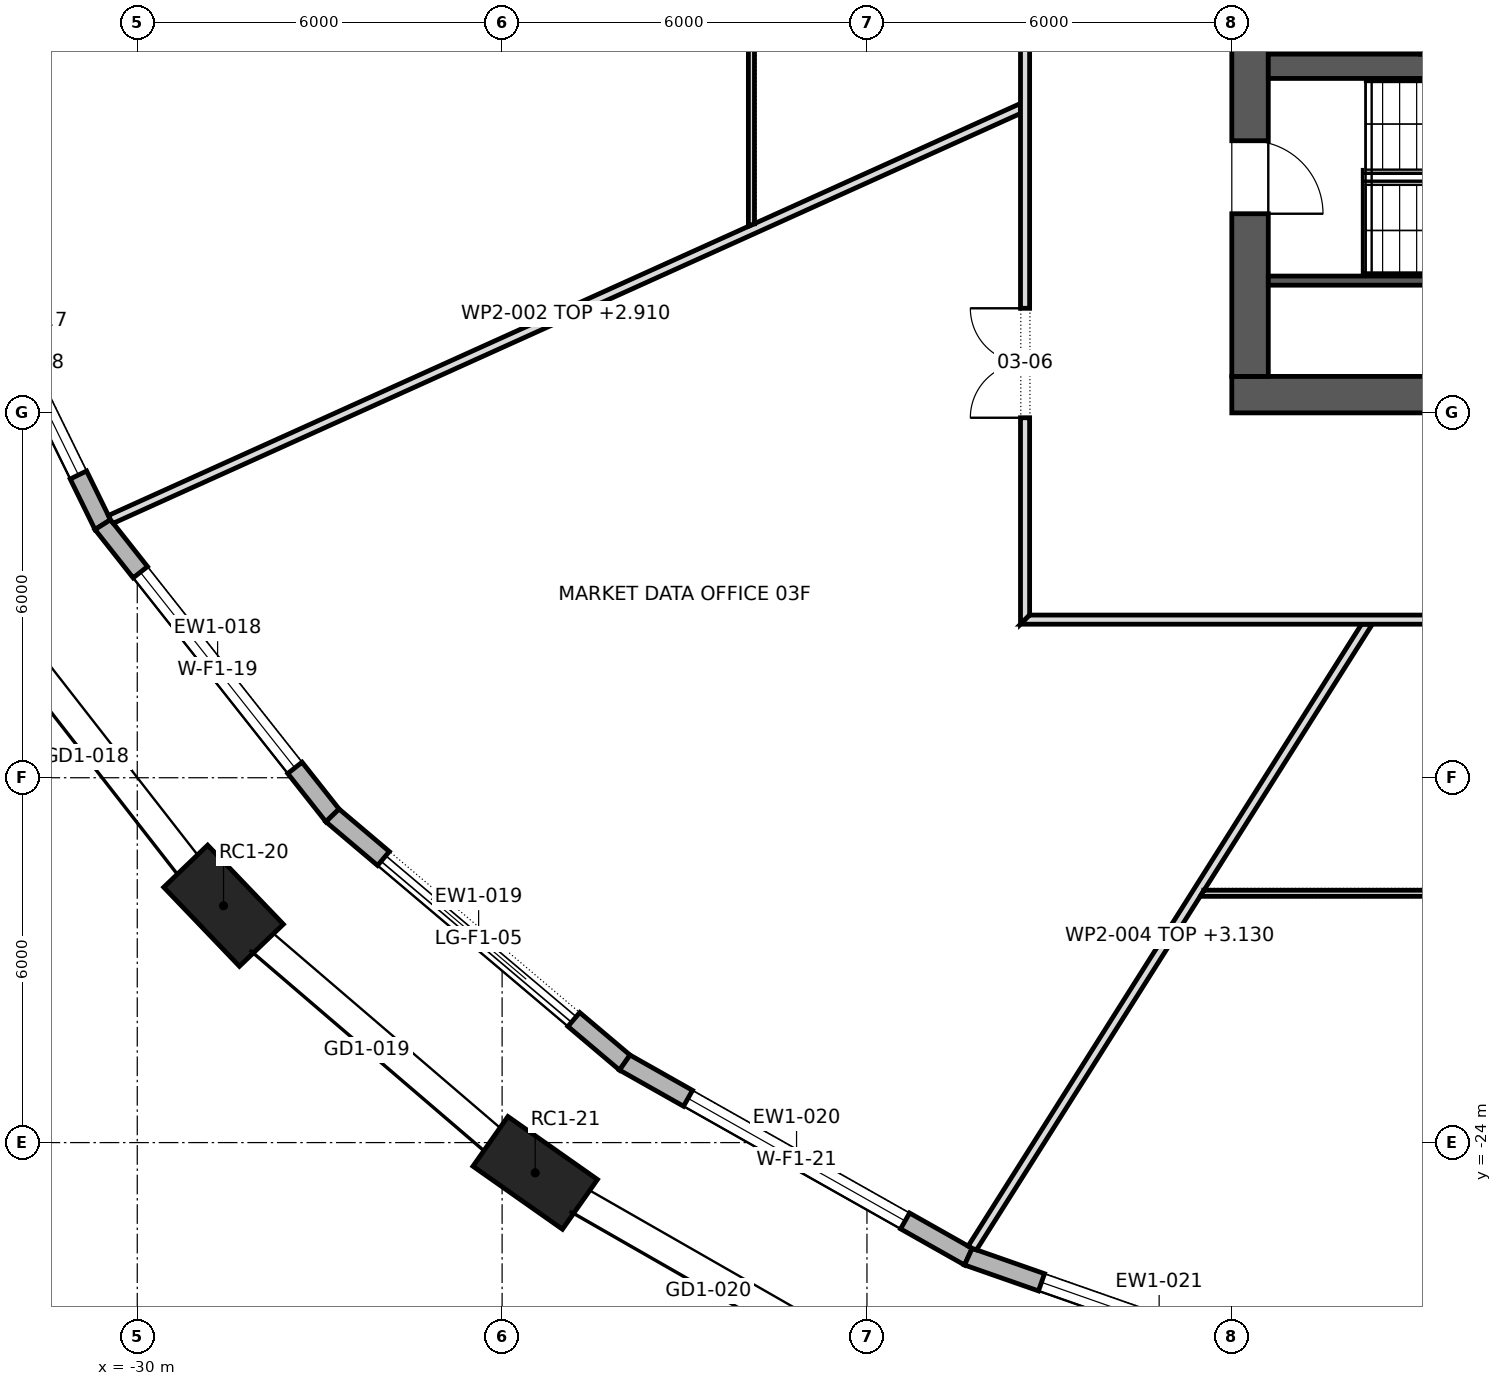
"""IFC4 building model, lengths in metres.
Left out: names, types, materials, properties, quantities, classifications, styles, units other than length and angle.
Written with IfcOpenShell. Run it as: python <this file> out.ifc"""

import sys

from ifc_helpers import new_model, si_unit, direction, frame, frame_2d, origin, origin_2d, place, context, subcontext, project, spatial, polyline, rectangle, outline, extrude, element, fill, save


model = new_model("IFC4")
c1 = context("Model", 3, precision=1e-05, world=origin(), true_north=direction((0.0, 1.0)))
c2 = subcontext(c1, "Body", "Model", "MODEL_VIEW")
j1 = project(units=[si_unit("LENGTHUNIT", "METRE"), si_unit("PLANEANGLEUNIT", "RADIAN")], contexts=[c1])
p1 = place(None, origin())
s1 = spatial("IfcSite", under=j1, at=p1, CompositionType="ELEMENT")
p2 = place(p1, origin())
s2 = spatial("IfcBuilding", under=s1, at=p2, CompositionType="ELEMENT")
p3 = place(p2, frame((0.0, 0.0, 57.1)))
s3 = spatial("IfcBuildingStorey", under=s2, at=p3, CompositionType="ELEMENT", Elevation=57.1)
for number, where, z_axis, x_axis in (
    (1, (-28.581, -20.105, 0.0), (0.0, 0.0, 1.0), (0.692, -0.722, 0.0)),
    (2, (-23.456, -24.498, 0.0), (0.0, 0.0, 1.0), (0.818, -0.575, 0.0)),
):
    element("IfcColumn", number, at=place(p3, frame(where, z_axis=z_axis, x_axis=x_axis)), inside=s3, PredefinedType="COLUMN", context=c2, shape_type="SweptSolid", body=[
        extrude(rectangle(XDim=1.8, YDim=1.0, at=origin_2d()), origin(), (0.0, 0.0, 1.0), 4.2),
    ])
p4 = place(p3, frame((-12.0, -11.7, 0.0), z_axis=(0.0, 0.0, 1.0), x_axis=(1.0, 0.0, 0.0)))
e3 = element("IfcWall", 3, at=p4, inside=s3, PredefinedType="SHEAR", context=c2, shape_type="SweptSolid", body=[
    extrude(rectangle(XDim=24.0, YDim=0.6, at=frame_2d((12.0, 0.0))), origin(), (0.0, 0.0, 1.0), 4.2),
])
p5 = place(p4, frame((9.975, 0.0, 0.0)))
e4 = element("IfcOpeningElement", 4, at=p5, cuts=e3, PredefinedType="OPENING", context=c2, shape_type="SweptSolid", body=[
    extrude(rectangle(XDim=0.9, YDim=2.1, at=frame_2d((0.45, 1.05))), frame((0.0, 0.312, 0.0), z_axis=(0.0, -1.0, 0.0), x_axis=(1.0, 0.0, 0.0)), (0.0, 0.0, 1.0), 0.624),
])
p6 = place(p4, frame((4.6, 0.0, 0.0)))
e5 = element("IfcOpeningElement", 5, at=p6, cuts=e3, PredefinedType="OPENING", context=c2, shape_type="SweptSolid", body=[
    extrude(rectangle(XDim=0.8, YDim=2.1, at=frame_2d((0.4, 1.05))), frame((0.0, 0.312, 0.0), z_axis=(0.0, -1.0, 0.0), x_axis=(1.0, 0.0, 0.0)), (0.0, 0.0, 1.0), 0.624),
])
p7 = place(p4, frame((7.0, 0.0, 0.0)))
e6 = element("IfcOpeningElement", 6, at=p7, cuts=e3, PredefinedType="OPENING", context=c2, shape_type="SweptSolid", body=[
    extrude(rectangle(XDim=0.8, YDim=2.1, at=frame_2d((0.4, 1.05))), frame((0.0, 0.312, 0.0), z_axis=(0.0, -1.0, 0.0), x_axis=(1.0, 0.0, 0.0)), (0.0, 0.0, 1.0), 0.624),
])
p8 = place(p4, frame((15.85, 0.0, 0.0)))
e7 = element("IfcOpeningElement", 7, at=p8, cuts=e3, PredefinedType="OPENING", context=c2, shape_type="SweptSolid", body=[
    extrude(rectangle(XDim=0.8, YDim=2.1, at=frame_2d((0.4, 1.05))), frame((0.0, 0.312, 0.0), z_axis=(0.0, -1.0, 0.0), x_axis=(1.0, 0.0, 0.0)), (0.0, 0.0, 1.0), 0.624),
])
p9 = place(p3, frame((-11.7, -11.4, 0.0), z_axis=(0.0, 0.0, 1.0), x_axis=(0.0, 1.0, 0.0)))
e8 = element("IfcWall", 8, at=p9, inside=s3, PredefinedType="SHEAR", context=c2, shape_type="SweptSolid", body=[
    extrude(rectangle(XDim=22.8, YDim=0.6, at=frame_2d((11.4, 0.0))), origin(), (0.0, 0.0, 1.0), 4.2),
])
p10 = place(p9, frame((10.2, 0.0, 0.0)))
e9 = element("IfcOpeningElement", 9, at=p10, cuts=e8, PredefinedType="OPENING", context=c2, shape_type="SweptSolid", body=[
    extrude(rectangle(XDim=2.4, YDim=2.1, at=frame_2d((1.2, 1.05))), frame((0.0, 0.312, 0.0), z_axis=(0.0, -1.0, 0.0), x_axis=(1.0, 0.0, 0.0)), (0.0, 0.0, 1.0), 0.624),
])
p11 = place(p9, frame((18.925, 0.0, 0.0)))
e10 = element("IfcOpeningElement", 10, at=p11, cuts=e8, PredefinedType="OPENING", context=c2, shape_type="SweptSolid", body=[
    extrude(rectangle(XDim=1.2, YDim=2.1, at=frame_2d((0.6, 1.05))), frame((0.0, 0.312, 0.0), z_axis=(0.0, -1.0, 0.0), x_axis=(1.0, 0.0, 0.0)), (0.0, 0.0, 1.0), 0.624),
])
p12 = place(p9, frame((2.675, 0.0, 0.0)))
e11 = element("IfcOpeningElement", 11, at=p12, cuts=e8, PredefinedType="OPENING", context=c2, shape_type="SweptSolid", body=[
    extrude(rectangle(XDim=1.2, YDim=2.1, at=frame_2d((0.6, 1.05))), frame((0.0, 0.312, 0.0), z_axis=(0.0, -1.0, 0.0), x_axis=(1.0, 0.0, 0.0)), (0.0, 0.0, 1.0), 0.624),
])
p13 = place(p3, frame((-11.4, -6.3, 0.0), z_axis=(0.0, 0.0, 1.0), x_axis=(1.0, 0.0, 0.0)))
e12 = element("IfcWall", 12, at=p13, inside=s3, PredefinedType="SHEAR", context=c2, shape_type="SweptSolid", body=[
    extrude(rectangle(XDim=22.8, YDim=0.4, at=frame_2d((11.4, 0.0))), origin(), (0.0, 0.0, 1.0), 4.2),
])
p14 = place(p13, frame((20.85, 0.0, 0.0)))
e13 = element("IfcOpeningElement", 13, at=p14, cuts=e12, PredefinedType="OPENING", context=c2, shape_type="SweptSolid", body=[
    extrude(rectangle(XDim=1.1, YDim=2.1, at=frame_2d((0.55, 1.05))), frame((0.0, 0.212, 0.0), z_axis=(0.0, -1.0, 0.0), x_axis=(1.0, 0.0, 0.0)), (0.0, 0.0, 1.0), 0.424),
])
p15 = place(p3, frame((-8.75, -6.1, 0.0), z_axis=(0.0, 0.0, 1.0), x_axis=(0.0, 1.0, 0.0)))
e14 = element("IfcWall", 14, at=p15, inside=s3, PredefinedType="SHEAR", context=c2, shape_type="SweptSolid", body=[
    extrude(rectangle(XDim=2.9, YDim=0.3, at=frame_2d((1.45, 0.0))), origin(), (0.0, 0.0, 1.0), 4.2),
])
p16 = place(p3, frame((-33.172, -8.523, 0.0), z_axis=(0.0, 0.0, 1.0), x_axis=(0.439906146647, -0.898043752911, 0.0)))
e15 = element("IfcWall", 15, at=p16, inside=s3, PredefinedType="STANDARD", context=c2, shape_type="SweptSolid", body=[
    extrude(outline(polyline([(-0.017, -0.15), (5.935, -0.15), (5.903, 0.15), (0.017, 0.15), (-0.017, -0.15)])), origin(), (0.0, 0.0, 1.0), 3.9),
])
p17 = place(p16, frame((0.909, 0.0, 0.6)))
e16 = element("IfcOpeningElement", 16, at=p17, cuts=e15, PredefinedType="OPENING", context=c2, shape_type="SweptSolid", body=[
    extrude(rectangle(XDim=4.1, YDim=2.85, at=frame_2d((2.05, 1.425))), frame((0.0, 0.162, 0.0), z_axis=(0.0, -1.0, 0.0), x_axis=(1.0, 0.0, 0.0)), (0.0, 0.0, 1.0), 0.324),
])
p18 = place(p3, frame((-30.568, -13.838, 0.0), z_axis=(0.0, 0.0, 1.0), x_axis=(0.619993638342, -0.78460683684, 0.0)))
e17 = element("IfcWall", 17, at=p18, inside=s3, PredefinedType="STANDARD", context=c2, shape_type="SweptSolid", body=[
    extrude(outline(polyline([(-0.016, -0.15), (6.109, -0.15), (6.079, 0.15), (0.016, 0.15), (-0.016, -0.15)])), origin(), (0.0, 0.0, 1.0), 3.9),
])
p19 = place(p18, frame((0.997, 0.0, 0.6)))
e18 = element("IfcOpeningElement", 18, at=p19, cuts=e17, PredefinedType="OPENING", context=c2, shape_type="SweptSolid", body=[
    extrude(rectangle(XDim=4.1, YDim=2.85, at=frame_2d((2.05, 1.425))), frame((0.0, 0.162, 0.0), z_axis=(0.0, -1.0, 0.0), x_axis=(1.0, 0.0, 0.0)), (0.0, 0.0, 1.0), 0.324),
])
p20 = place(p3, frame((-26.79, -18.62, 0.0), z_axis=(0.0, 0.0, 1.0), x_axis=(0.763614259808, -0.645672720671, 0.0)))
e19 = element("IfcWall", 19, at=p20, inside=s3, PredefinedType="STANDARD", context=c2, shape_type="SweptSolid", body=[
    extrude(outline(polyline([(-0.015, -0.15), (6.309, -0.15), (6.281, 0.15), (0.015, 0.15), (-0.015, -0.15)])), origin(), (0.0, 0.0, 1.0), 3.9),
])
p21 = place(p20, frame((1.097, 0.0, 0.0)))
e20 = element("IfcOpeningElement", 20, at=p21, cuts=e19, PredefinedType="OPENING", context=c2, shape_type="SweptSolid", body=[
    extrude(rectangle(XDim=4.1, YDim=3.45, at=frame_2d((2.05, 1.725))), frame((0.0, 0.162, 0.0), z_axis=(0.0, -1.0, 0.0), x_axis=(1.0, 0.0, 0.0)), (0.0, 0.0, 1.0), 0.324),
])
p22 = place(p3, frame((-21.983, -22.684, 0.0), z_axis=(0.0, 0.0, 1.0), x_axis=(0.870647609977, -0.491907246584, 0.0)))
e21 = element("IfcWall", 21, at=p22, inside=s3, PredefinedType="STANDARD", context=c2, shape_type="SweptSolid", body=[
    extrude(outline(polyline([(-0.014, -0.15), (6.503, -0.15), (6.476, 0.15), (0.014, 0.15), (-0.014, -0.15)])), origin(), (0.0, 0.0, 1.0), 3.9),
])
p23 = place(p22, frame((1.195, 0.0, 0.6)))
e22 = element("IfcOpeningElement", 22, at=p23, cuts=e21, PredefinedType="OPENING", context=c2, shape_type="SweptSolid", body=[
    extrude(rectangle(XDim=4.1, YDim=2.85, at=frame_2d((2.05, 1.425))), frame((0.0, 0.162, 0.0), z_axis=(0.0, -1.0, 0.0), x_axis=(1.0, 0.0, 0.0)), (0.0, 0.0, 1.0), 0.324),
])
p24 = place(p3, frame((-16.333, -25.876, 0.0), z_axis=(0.0, 0.0, 1.0), x_axis=(0.943790794479, -0.330543395421, 0.0)))
e23 = element("IfcWall", 23, at=p24, inside=s3, PredefinedType="STANDARD", context=c2, shape_type="SweptSolid", body=[
    extrude(outline(polyline([(-0.013, -0.15), (6.662, -0.15), (6.637, 0.15), (0.013, 0.15), (-0.013, -0.15)])), origin(), (0.0, 0.0, 1.0), 3.9),
])
p25 = place(p24, frame((1.275, 0.0, 0.6)))
e24 = element("IfcOpeningElement", 24, at=p25, cuts=e23, PredefinedType="OPENING", context=c2, shape_type="SweptSolid", body=[
    extrude(rectangle(XDim=4.1, YDim=2.85, at=frame_2d((2.05, 1.425))), frame((0.0, 0.162, 0.0), z_axis=(0.0, -1.0, 0.0), x_axis=(1.0, 0.0, 0.0)), (0.0, 0.0, 1.0), 0.324),
])
p26 = place(p3, frame((-11.4, -9.825, 0.0), z_axis=(0.0, 0.0, 1.0), x_axis=(1.0, 0.0, 0.0)))
e25 = element("IfcWall", 25, at=p26, inside=s3, PredefinedType="SHEAR", context=c2, shape_type="SweptSolid", body=[
    extrude(rectangle(XDim=8.0, YDim=0.15, at=frame_2d((4.0, 0.0))), origin(), (0.0, 0.0, 1.0), 3.9),
])
p27 = place(p3, frame((-30.444, -13.755, 0.0), z_axis=(0.0, 0.0, 1.0), x_axis=(0.911343853748, 0.411645940385, 0.0)))
e26 = element("IfcWall", 26, at=p27, inside=s3, PredefinedType="PARTITIONING", context=c2, shape_type="SweptSolid", body=[
    extrude(outline(polyline([(0.02, -0.075), (1.839, -0.075), (3.658, -0.075), (5.477, -0.075), (7.296, -0.075), (9.115, -0.075), (10.934, -0.075), (12.753, -0.075), (14.572, -0.075), (16.391, -0.075), (16.442, 0.038), (16.442, 0.038), (16.458, 0.075), (14.858, 0.075), (13.258, 0.075), (11.658, 0.075), (11.657, 0.073), (11.653, 0.075), (9.711, 0.075), (7.769, 0.075), (5.826, 0.075), (3.884, 0.075), (1.942, 0.075), (0.0, 0.075), (0.0, 0.062), (0.002, -0.004), (0.02, -0.075)])), origin(), (0.0, 0.0, 1.0), 2.91),
])
p28 = place(p3, frame((-19.9, -8.933, 0.0), z_axis=(0.0, 0.0, 1.0), x_axis=(0.0, 1.0, 0.0)))
e27 = element("IfcWall", 27, at=p28, inside=s3, PredefinedType="PARTITIONING", context=c2, shape_type="SweptSolid", body=[
    extrude(outline(polyline([(0.045, -0.05), (1.789, -0.05), (3.533, -0.05), (5.277, -0.05), (7.021, -0.05), (8.765, -0.05), (10.51, -0.05), (10.518, 0.046), (10.518, 0.05), (8.765, 0.05), (7.012, 0.05), (5.259, 0.05), (3.506, 0.05), (1.753, 0.05), (0.0, 0.05), (0.0, 0.05), (0.045, -0.05)])), origin(), (0.0, 0.0, 1.0), 3.9),
])
p29 = place(p28, frame((4.817, 0.0, 0.0)))
e28 = element("IfcOpeningElement", 28, at=p29, cuts=e27, PredefinedType="OPENING", context=c2, shape_type="SweptSolid", body=[
    extrude(rectangle(XDim=0.9, YDim=2.1, at=frame_2d((0.45, 1.05))), frame((0.0, 0.062, 0.0), z_axis=(0.0, -1.0, 0.0), x_axis=(1.0, 0.0, 0.0)), (0.0, 0.0, 1.0), 0.124),
])
p30 = place(p3, frame((-16.273, -25.742, 0.0), z_axis=(0.0, 0.0, 1.0), x_axis=(0.534654841392, 0.845070529942, 0.0)))
e29 = element("IfcWall", 29, at=p30, inside=s3, PredefinedType="PARTITIONING", context=c2, shape_type="SweptSolid", body=[
    extrude(outline(polyline([(0.021, -0.075), (1.769, -0.075), (3.517, -0.075), (5.265, -0.075), (7.013, -0.075), (7.018, -0.072), (7.019, -0.075), (8.745, -0.075), (10.471, -0.075), (12.196, -0.075), (12.196, -0.075), (12.102, 0.075), (10.373, 0.075), (8.644, 0.075), (6.915, 0.075), (5.186, 0.075), (3.458, 0.075), (1.729, 0.075), (0.0, 0.075), (0.0, 0.071), (0.004, -0.0), (0.021, -0.075)])), origin(), (0.0, 0.0, 1.0), 3.13),
])
p31 = place(p3, frame((-15.4, -15.475, 0.0), z_axis=(0.0, 0.0, 1.0), x_axis=(0.0, 1.0, 0.0)))
e30 = element("IfcWall", 30, at=p31, inside=s3, PredefinedType="PARTITIONING", context=c2, shape_type="SweptSolid", body=[
    extrude(outline(polyline([(0.15, -0.075), (2.066, -0.075), (3.981, -0.075), (5.897, -0.075), (7.812, -0.075), (9.728, -0.075), (11.644, -0.075), (13.56, -0.075), (15.475, -0.075), (17.391, -0.075), (19.306, -0.075), (21.222, -0.075), (23.138, -0.075), (25.053, -0.075), (26.969, -0.075), (28.885, -0.075), (30.8, -0.075), (30.95, 0.075), (29.016, 0.075), (27.081, 0.075), (25.147, 0.075), (23.212, 0.075), (21.278, 0.075), (19.344, 0.075), (17.409, 0.075), (15.475, 0.075), (13.541, 0.075), (11.606, 0.075), (9.672, 0.075), (7.738, 0.075), (5.803, 0.075), (3.869, 0.075), (1.935, 0.075), (0.0, 0.075), (0.15, -0.075)])), origin(), (0.0, 0.0, 1.0), 3.9),
])
p32 = place(p31, frame((25.755, 0.0, 0.0)))
e31 = element("IfcOpeningElement", 31, at=p32, cuts=e30, PredefinedType="OPENING", context=c2, shape_type="SweptSolid", body=[
    extrude(rectangle(XDim=1.8, YDim=2.1, at=frame_2d((0.9, 1.05))), frame((0.0, 0.087, 0.0), z_axis=(0.0, -1.0, 0.0), x_axis=(1.0, 0.0, 0.0)), (0.0, 0.0, 1.0), 0.174),
])
p33 = place(p31, frame((18.695, 0.0, 0.0)))
e32 = element("IfcOpeningElement", 32, at=p33, cuts=e30, PredefinedType="OPENING", context=c2, shape_type="SweptSolid", body=[
    extrude(rectangle(XDim=1.8, YDim=2.1, at=frame_2d((0.9, 1.05))), frame((0.0, 0.087, 0.0), z_axis=(0.0, -1.0, 0.0), x_axis=(1.0, 0.0, 0.0)), (0.0, 0.0, 1.0), 0.174),
])
p34 = place(p31, frame((12.135, 0.0, 0.0)))
e33 = element("IfcOpeningElement", 33, at=p34, cuts=e30, PredefinedType="OPENING", context=c2, shape_type="SweptSolid", body=[
    extrude(rectangle(XDim=1.0, YDim=2.1, at=frame_2d((0.5, 1.05))), frame((0.0, 0.087, 0.0), z_axis=(0.0, -1.0, 0.0), x_axis=(1.0, 0.0, 0.0)), (0.0, 0.0, 1.0), 0.174),
])
p35 = place(p31, frame((3.395, 0.0, 0.0)))
e34 = element("IfcOpeningElement", 34, at=p35, cuts=e30, PredefinedType="OPENING", context=c2, shape_type="SweptSolid", body=[
    extrude(rectangle(XDim=1.8, YDim=2.1, at=frame_2d((0.9, 1.05))), frame((0.0, 0.087, 0.0), z_axis=(0.0, -1.0, 0.0), x_axis=(1.0, 0.0, 0.0)), (0.0, 0.0, 1.0), 0.174),
])
p36 = place(p3, frame((-15.475, -15.4, 0.0), z_axis=(0.0, 0.0, 1.0), x_axis=(1.0, 0.0, 0.0)))
e35 = element("IfcWall", 35, at=p36, inside=s3, PredefinedType="PARTITIONING", context=c2, shape_type="SweptSolid", body=[
    extrude(outline(polyline([(0.0, -0.075), (1.935, -0.075), (3.869, -0.075), (5.803, -0.075), (7.738, -0.075), (9.672, -0.075), (11.606, -0.075), (13.541, -0.075), (15.475, -0.075), (17.409, -0.075), (19.344, -0.075), (21.278, -0.075), (23.212, -0.075), (25.147, -0.075), (27.081, -0.075), (29.016, -0.075), (30.95, -0.075), (30.8, 0.075), (28.885, 0.075), (26.969, 0.075), (25.053, 0.075), (23.138, 0.075), (21.222, 0.075), (19.306, 0.075), (17.391, 0.075), (15.475, 0.075), (13.56, 0.075), (11.644, 0.075), (9.728, 0.075), (7.812, 0.075), (5.897, 0.075), (3.981, 0.075), (2.066, 0.075), (0.15, 0.075), (0.0, -0.075)])), origin(), (0.0, 0.0, 1.0), 3.9),
])
p37 = place(p36, frame((10.445, 0.0, 0.0)))
e36 = element("IfcOpeningElement", 36, at=p37, cuts=e35, PredefinedType="OPENING", context=c2, shape_type="SweptSolid", body=[
    extrude(rectangle(XDim=1.0, YDim=2.1, at=frame_2d((0.5, 1.05))), frame((0.0, 0.087, 0.0), z_axis=(0.0, -1.0, 0.0), x_axis=(1.0, 0.0, 0.0)), (0.0, 0.0, 1.0), 0.174),
])
p38 = place(p36, frame((18.07, 0.0, 0.0)))
e37 = element("IfcOpeningElement", 37, at=p38, cuts=e35, PredefinedType="OPENING", context=c2, shape_type="SweptSolid", body=[
    extrude(rectangle(XDim=1.0, YDim=2.1, at=frame_2d((0.5, 1.05))), frame((0.0, 0.087, 0.0), z_axis=(0.0, -1.0, 0.0), x_axis=(1.0, 0.0, 0.0)), (0.0, 0.0, 1.0), 0.174),
])
p39 = place(p36, frame((25.035, 0.0, 0.0)))
e38 = element("IfcOpeningElement", 38, at=p39, cuts=e35, PredefinedType="OPENING", context=c2, shape_type="SweptSolid", body=[
    extrude(rectangle(XDim=1.8, YDim=2.1, at=frame_2d((0.9, 1.05))), frame((0.0, 0.087, 0.0), z_axis=(0.0, -1.0, 0.0), x_axis=(1.0, 0.0, 0.0)), (0.0, 0.0, 1.0), 0.174),
])
p40 = place(p3, frame((-12.52, -19.9, 0.0), z_axis=(0.0, 0.0, 1.0), x_axis=(1.0, 0.0, 0.0)))
e39 = element("IfcWall", 39, at=p40, inside=s3, PredefinedType="PARTITIONING", context=c2, shape_type="SweptSolid", body=[
    extrude(outline(polyline([(19.594, -0.05), (19.594, -0.049), (19.558, 0.05), (17.978, 0.05), (16.399, 0.05), (14.819, 0.05), (13.24, 0.05), (13.24, 0.05), (13.14, 0.05), (13.14, 0.05), (11.271, 0.05), (9.403, 0.05), (7.535, 0.05), (5.667, 0.05), (3.799, 0.05), (1.931, 0.05), (0.063, 0.05), (0.0, -0.05), (0.0, -0.05), (1.959, -0.05), (3.919, -0.05), (5.878, -0.05), (7.837, -0.05), (9.797, -0.05), (11.756, -0.05), (13.715, -0.05), (15.675, -0.05), (17.634, -0.05), (19.594, -0.05)])), origin(), (0.0, 0.0, 1.0), 3.9),
])
p41 = place(p40, frame((6.115, 0.0, 0.0)))
e40 = element("IfcOpeningElement", 40, at=p41, cuts=e39, PredefinedType="OPENING", context=c2, shape_type="SweptSolid", body=[
    extrude(rectangle(XDim=0.9, YDim=2.1, at=frame_2d((0.45, 1.05))), frame((0.0, 0.062, 0.0), z_axis=(0.0, -1.0, 0.0), x_axis=(1.0, 0.0, 0.0)), (0.0, 0.0, 1.0), 0.124),
])
p42 = place(p17, origin())
e41 = element("IfcWindow", 41, at=p42, inside=s3, PartitioningType="TRIPLE_PANEL_VERTICAL", PredefinedType="WINDOW", context=c2, shape_type="SweptSolid", body=[
    extrude(rectangle(XDim=4.1, YDim=2.85, at=frame_2d((2.05, 1.425))), frame((0.0, 0.03, 0.0), z_axis=(0.0, -1.0, 0.0), x_axis=(1.0, 0.0, 0.0)), (0.0, 0.0, 1.0), 0.06),
])
fill(e16, e41)
p43 = place(p19, origin())
e42 = element("IfcWindow", 42, at=p43, inside=s3, PartitioningType="TRIPLE_PANEL_VERTICAL", PredefinedType="WINDOW", context=c2, shape_type="SweptSolid", body=[
    extrude(rectangle(XDim=4.1, YDim=2.85, at=frame_2d((2.05, 1.425))), frame((0.0, 0.03, 0.0), z_axis=(0.0, -1.0, 0.0), x_axis=(1.0, 0.0, 0.0)), (0.0, 0.0, 1.0), 0.06),
])
fill(e18, e42)
p44 = place(p21, origin())
e43 = element("IfcDoor", 43, at=p44, inside=s3, OperationType="DOUBLE_DOOR_SLIDING", PredefinedType="DOOR", context=c2, shape_type="SweptSolid", body=[
    extrude(rectangle(XDim=4.1, YDim=3.45, at=frame_2d((2.05, 1.725))), frame((0.0, 0.025, 0.0), z_axis=(0.0, -1.0, 0.0), x_axis=(1.0, 0.0, 0.0)), (0.0, 0.0, 1.0), 0.05),
])
fill(e20, e43)
p45 = place(p23, origin())
e44 = element("IfcWindow", 44, at=p45, inside=s3, PartitioningType="TRIPLE_PANEL_VERTICAL", PredefinedType="WINDOW", context=c2, shape_type="SweptSolid", body=[
    extrude(rectangle(XDim=4.1, YDim=2.85, at=frame_2d((2.05, 1.425))), frame((0.0, 0.03, 0.0), z_axis=(0.0, -1.0, 0.0), x_axis=(1.0, 0.0, 0.0)), (0.0, 0.0, 1.0), 0.06),
])
fill(e22, e44)
p46 = place(p25, origin())
e45 = element("IfcWindow", 45, at=p46, inside=s3, PartitioningType="TRIPLE_PANEL_VERTICAL", PredefinedType="WINDOW", context=c2, shape_type="SweptSolid", body=[
    extrude(rectangle(XDim=4.1, YDim=2.85, at=frame_2d((2.05, 1.425))), frame((0.0, 0.03, 0.0), z_axis=(0.0, -1.0, 0.0), x_axis=(1.0, 0.0, 0.0)), (0.0, 0.0, 1.0), 0.06),
])
fill(e24, e45)
p47 = place(p12, frame((1.2, 0.0, 0.0), z_axis=(0.0, 0.0, 1.0), x_axis=(-1.0, 0.0, 0.0)))
e46 = element("IfcDoor", 46, at=p47, inside=s3, OperationType="SINGLE_SWING_LEFT", PredefinedType="DOOR", context=c2, shape_type="SweptSolid", body=[
    extrude(rectangle(XDim=1.2, YDim=2.1, at=frame_2d((0.6, 1.05))), frame((0.0, 0.025, 0.0), z_axis=(0.0, -1.0, 0.0), x_axis=(1.0, 0.0, 0.0)), (0.0, 0.0, 1.0), 0.05),
])
fill(e11, e46)
p48 = place(p35, origin())
e47 = element("IfcDoor", 47, at=p48, inside=s3, OperationType="DOUBLE_DOOR_SINGLE_SWING", PredefinedType="DOOR", context=c2, shape_type="SweptSolid", body=[
    extrude(rectangle(XDim=1.8, YDim=2.1, at=frame_2d((0.9, 1.05))), frame((0.0, 0.025, 0.0), z_axis=(0.0, -1.0, 0.0), x_axis=(1.0, 0.0, 0.0)), (0.0, 0.0, 1.0), 0.05),
])
fill(e34, e47)
save(model, sys.argv[1])
